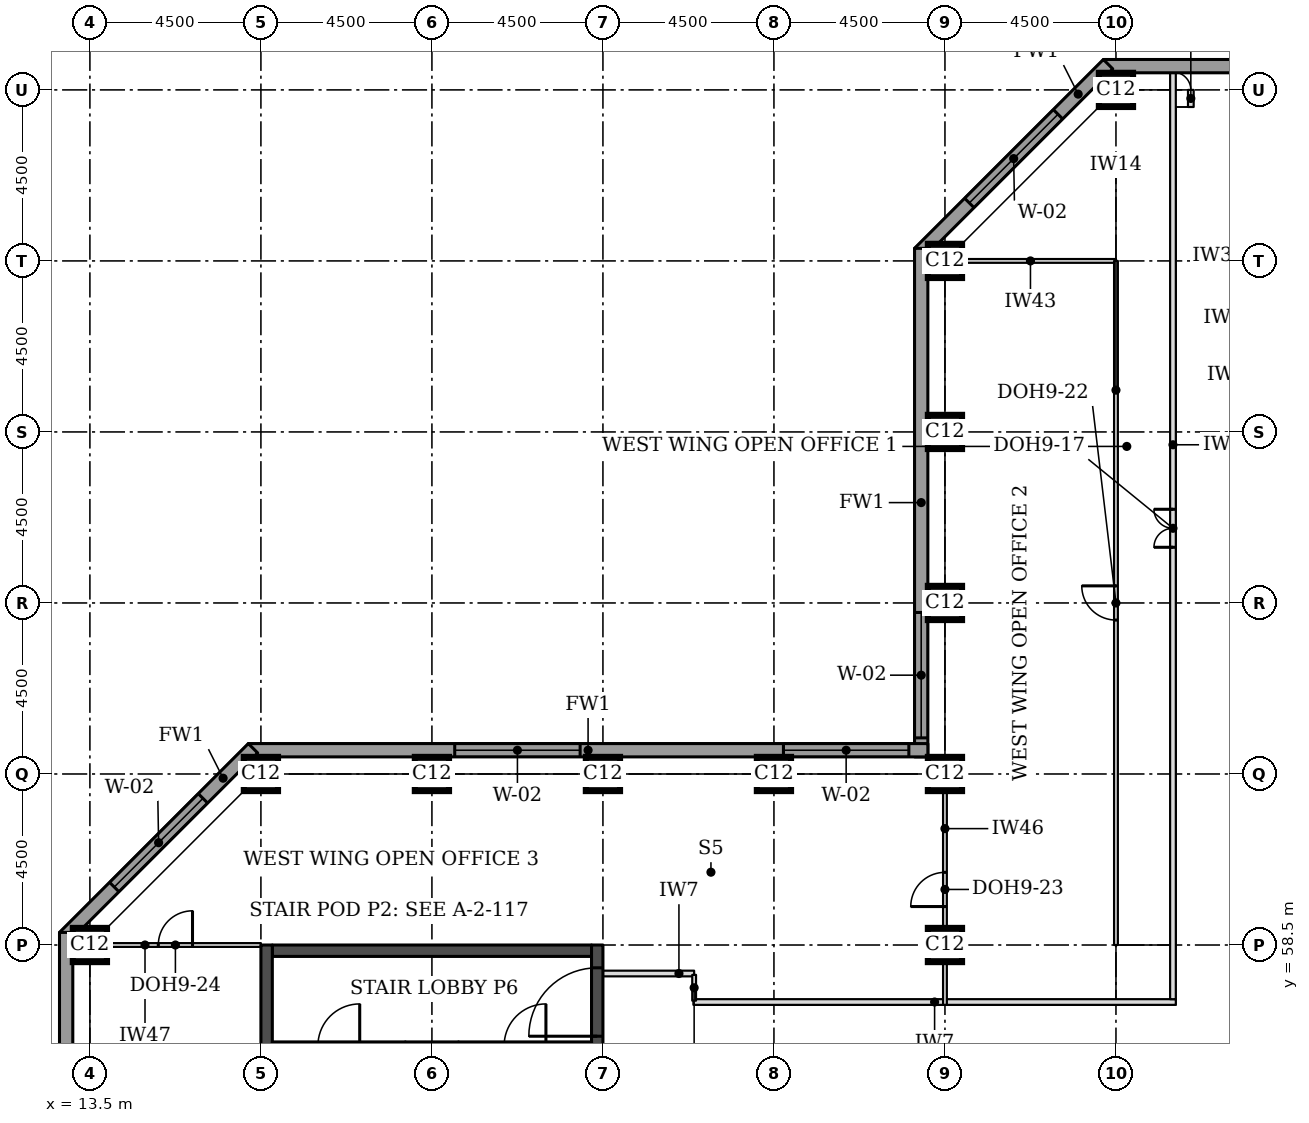
"""IFC4 building model, lengths in metres.
Left out: names, types, materials, properties, quantities, classifications, styles, units other than length and angle.
Written with IfcOpenShell. Run it as: python <this file> out.ifc"""

import sys

from ifc_helpers import new_model, si_unit, direction, frame, frame_2d, origin, origin_2d, place, context, subcontext, project, spatial, rectangle, extrude, element, fill, save


model = new_model("IFC4")
c1 = context("Model", 3, precision=1e-05, world=origin(), true_north=direction((0.0, 1.0)))
c2 = subcontext(c1, "Body", "Model", "MODEL_VIEW")
j1 = project(units=[si_unit("LENGTHUNIT", "METRE"), si_unit("PLANEANGLEUNIT", "RADIAN")], contexts=[c1])
p1 = place(None, origin())
s1 = spatial("IfcSite", under=j1, at=p1, CompositionType="ELEMENT")
p2 = place(p1, origin())
s2 = spatial("IfcBuilding", under=s1, at=p2, CompositionType="ELEMENT")
p3 = place(p2, frame((0.0, 0.0, 215.6)))
s3 = spatial("IfcBuildingStorey", under=s2, at=p3, CompositionType="ELEMENT", Elevation=215.6)
for number, where, z_axis, x_axis in (
    (1, (13.5, 58.5, 0.0), (0.0, 0.0, 1.0), (1.0, 0.0, 0.0)),
    (2, (36.0, 58.5, 0.0), (0.0, 0.0, 1.0), (1.0, 0.0, 0.0)),
    (3, (18.0, 63.0, 0.0), (0.0, 0.0, 1.0), (1.0, 0.0, 0.0)),
    (4, (22.5, 63.0, 0.0), (0.0, 0.0, 1.0), (1.0, 0.0, 0.0)),
    (5, (27.0, 63.0, 0.0), (0.0, 0.0, 1.0), (1.0, 0.0, 0.0)),
    (6, (31.5, 63.0, 0.0), (0.0, 0.0, 1.0), (1.0, 0.0, 0.0)),
    (7, (36.0, 63.0, 0.0), (0.0, 0.0, 1.0), (1.0, 0.0, 0.0)),
    (8, (36.0, 67.5, 0.0), (0.0, 0.0, 1.0), (1.0, 0.0, 0.0)),
    (9, (36.0, 72.0, 0.0), (0.0, 0.0, 1.0), (1.0, 0.0, 0.0)),
    (10, (36.0, 76.5, 0.0), (0.0, 0.0, 1.0), (1.0, 0.0, 0.0)),
    (11, (40.5, 81.0, 0.0), (0.0, 0.0, 1.0), (1.0, 0.0, 0.0)),
):
    element("IfcColumn", number, at=place(p3, frame(where, z_axis=z_axis, x_axis=x_axis)), inside=s3, PredefinedType="COLUMN", context=c2, shape_type="SweptSolid", body=[
        extrude(rectangle(XDim=0.9, YDim=0.9, at=origin_2d()), origin(), (0.0, 0.0, 1.0), 3.7),
    ])
p4 = place(p3, frame((18.3, 58.35, 0.0), z_axis=(0.0, 0.0, 1.0), x_axis=(1.0, 0.0, 0.0)))
e12 = element("IfcWall", 12, at=p4, inside=s3, PredefinedType="SHEAR", context=c2, shape_type="SweptSolid", body=[
    extrude(rectangle(XDim=8.4, YDim=0.3, at=frame_2d((4.2, 0.0))), origin(), (0.0, 0.0, 1.0), 3.7),
])
p5 = place(p3, frame((18.15, 49.5, 0.0), z_axis=(0.0, 0.0, 1.0), x_axis=(0.0, 1.0, 0.0)))
e13 = element("IfcWall", 13, at=p5, inside=s3, PredefinedType="SHEAR", context=c2, shape_type="SweptSolid", body=[
    extrude(rectangle(XDim=9.0, YDim=0.3, at=frame_2d((4.5, 0.0))), origin(), (0.0, 0.0, 1.0), 3.7),
])
p6 = place(p3, frame((26.85, 49.5, 0.0), z_axis=(0.0, 0.0, 1.0), x_axis=(0.0, 1.0, 0.0)))
e14 = element("IfcWall", 14, at=p6, inside=s3, PredefinedType="SHEAR", context=c2, shape_type="SweptSolid", body=[
    extrude(rectangle(XDim=9.0, YDim=0.3, at=frame_2d((4.5, 0.0))), origin(), (0.0, 0.0, 1.0), 3.7),
])
p7 = place(p6, frame((6.6, 0.0, 0.0)))
e15 = element("IfcOpeningElement", 15, at=p7, cuts=e14, PredefinedType="OPENING", context=c2, shape_type="SweptSolid", body=[
    extrude(rectangle(XDim=1.8, YDim=2.1, at=frame_2d((0.9, 1.05))), frame((0.0, 0.16, 0.0), z_axis=(0.0, -1.0, 0.0), x_axis=(1.0, 0.0, 0.0)), (0.0, 0.0, 1.0), 0.32),
])
p8 = place(p3, frame((72.331, 81.625, 0.0), z_axis=(0.0, 0.0, 1.0), x_axis=(-1.0, 0.0, 0.0)))
e16 = element("IfcWall", 16, at=p8, inside=s3, PredefinedType="STANDARD", context=c2, shape_type="SweptSolid", body=[
    extrude(rectangle(XDim=32.163, YDim=0.35, at=frame_2d((16.081, 0.0))), origin(), (0.0, 0.0, 1.0), 3.525),
])
p9 = place(p8, frame((5.431, 0.0, 0.9)))
e17 = element("IfcOpeningElement", 17, at=p9, cuts=e16, PredefinedType="OPENING", context=c2, shape_type="SweptSolid", body=[
    extrude(rectangle(XDim=3.3, YDim=1.9, at=frame_2d((1.65, 0.95))), frame((0.0, 0.185, 0.0), z_axis=(0.0, -1.0, 0.0), x_axis=(1.0, 0.0, 0.0)), (0.0, 0.0, 1.0), 0.37),
])
p10 = place(p8, frame((9.931, 0.0, 0.9)))
e18 = element("IfcOpeningElement", 18, at=p10, cuts=e16, PredefinedType="OPENING", context=c2, shape_type="SweptSolid", body=[
    extrude(rectangle(XDim=3.3, YDim=1.9, at=frame_2d((1.65, 0.95))), frame((0.0, 0.185, 0.0), z_axis=(0.0, -1.0, 0.0), x_axis=(1.0, 0.0, 0.0)), (0.0, 0.0, 1.0), 0.37),
])
p11 = place(p8, frame((14.431, 0.0, 0.9)))
e19 = element("IfcOpeningElement", 19, at=p11, cuts=e16, PredefinedType="OPENING", context=c2, shape_type="SweptSolid", body=[
    extrude(rectangle(XDim=3.3, YDim=1.9, at=frame_2d((1.65, 0.95))), frame((0.0, 0.185, 0.0), z_axis=(0.0, -1.0, 0.0), x_axis=(1.0, 0.0, 0.0)), (0.0, 0.0, 1.0), 0.37),
])
p12 = place(p8, frame((18.931, 0.0, 0.9)))
e20 = element("IfcOpeningElement", 20, at=p12, cuts=e16, PredefinedType="OPENING", context=c2, shape_type="SweptSolid", body=[
    extrude(rectangle(XDim=3.3, YDim=1.9, at=frame_2d((1.65, 0.95))), frame((0.0, 0.185, 0.0), z_axis=(0.0, -1.0, 0.0), x_axis=(1.0, 0.0, 0.0)), (0.0, 0.0, 1.0), 0.37),
])
p13 = place(p8, frame((23.431, 0.0, 0.9)))
e21 = element("IfcOpeningElement", 21, at=p13, cuts=e16, PredefinedType="OPENING", context=c2, shape_type="SweptSolid", body=[
    extrude(rectangle(XDim=3.3, YDim=1.9, at=frame_2d((1.65, 0.95))), frame((0.0, 0.185, 0.0), z_axis=(0.0, -1.0, 0.0), x_axis=(1.0, 0.0, 0.0)), (0.0, 0.0, 1.0), 0.37),
])
p14 = place(p3, frame((40.292, 81.676, 0.0), z_axis=(0.0, 0.0, 1.0), x_axis=(-0.707106781187, -0.707106781187, 0.0)))
e22 = element("IfcWall", 22, at=p14, inside=s3, PredefinedType="STANDARD", context=c2, shape_type="SweptSolid", body=[
    extrude(rectangle(XDim=7.027, YDim=0.35, at=frame_2d((3.513, 0.0))), origin(), (0.0, 0.0, 1.0), 3.525),
])
p15 = place(p14, frame((1.863, 0.0, 0.9)))
e23 = element("IfcOpeningElement", 23, at=p15, cuts=e22, PredefinedType="OPENING", context=c2, shape_type="SweptSolid", body=[
    extrude(rectangle(XDim=3.3, YDim=1.9, at=frame_2d((1.65, 0.95))), frame((0.0, 0.185, 0.0), z_axis=(0.0, -1.0, 0.0), x_axis=(1.0, 0.0, 0.0)), (0.0, 0.0, 1.0), 0.37),
])
p16 = place(p3, frame((35.375, 76.831, 0.0), z_axis=(0.0, 0.0, 1.0), x_axis=(0.0, -1.0, 0.0)))
e24 = element("IfcWall", 24, at=p16, inside=s3, PredefinedType="STANDARD", context=c2, shape_type="SweptSolid", body=[
    extrude(rectangle(XDim=13.381, YDim=0.35, at=frame_2d((6.691, 0.0))), origin(), (0.0, 0.0, 1.0), 3.525),
])
p17 = place(p16, frame((9.581, 0.0, 0.9)))
e25 = element("IfcOpeningElement", 25, at=p17, cuts=e24, PredefinedType="OPENING", context=c2, shape_type="SweptSolid", body=[
    extrude(rectangle(XDim=3.3, YDim=1.9, at=frame_2d((1.65, 0.95))), frame((0.0, 0.185, 0.0), z_axis=(0.0, -1.0, 0.0), x_axis=(1.0, 0.0, 0.0)), (0.0, 0.0, 1.0), 0.37),
])
p18 = place(p3, frame((35.55, 63.625, 0.0), z_axis=(0.0, 0.0, 1.0), x_axis=(-1.0, 0.0, 0.0)))
e26 = element("IfcWall", 26, at=p18, inside=s3, PredefinedType="STANDARD", context=c2, shape_type="SweptSolid", body=[
    extrude(rectangle(XDim=17.881, YDim=0.35, at=frame_2d((8.941, 0.0))), origin(), (0.0, 0.0, 1.0), 3.525),
])
p19 = place(p18, frame((0.5, 0.0, 0.9)))
e27 = element("IfcOpeningElement", 27, at=p19, cuts=e26, PredefinedType="OPENING", context=c2, shape_type="SweptSolid", body=[
    extrude(rectangle(XDim=3.3, YDim=1.9, at=frame_2d((1.65, 0.95))), frame((0.0, 0.185, 0.0), z_axis=(0.0, -1.0, 0.0), x_axis=(1.0, 0.0, 0.0)), (0.0, 0.0, 1.0), 0.37),
])
p20 = place(p18, frame((9.15, 0.0, 0.9)))
e28 = element("IfcOpeningElement", 28, at=p20, cuts=e26, PredefinedType="OPENING", context=c2, shape_type="SweptSolid", body=[
    extrude(rectangle(XDim=3.3, YDim=1.9, at=frame_2d((1.65, 0.95))), frame((0.0, 0.185, 0.0), z_axis=(0.0, -1.0, 0.0), x_axis=(1.0, 0.0, 0.0)), (0.0, 0.0, 1.0), 0.37),
])
p21 = place(p3, frame((17.792, 63.676, 0.0), z_axis=(0.0, 0.0, 1.0), x_axis=(-0.707106781187, -0.707106781187, 0.0)))
e29 = element("IfcWall", 29, at=p21, inside=s3, PredefinedType="STANDARD", context=c2, shape_type="SweptSolid", body=[
    extrude(rectangle(XDim=7.027, YDim=0.35, at=frame_2d((3.513, 0.0))), origin(), (0.0, 0.0, 1.0), 3.525),
])
p22 = place(p21, frame((1.863, 0.0, 0.9)))
e30 = element("IfcOpeningElement", 30, at=p22, cuts=e29, PredefinedType="OPENING", context=c2, shape_type="SweptSolid", body=[
    extrude(rectangle(XDim=3.3, YDim=1.9, at=frame_2d((1.65, 0.95))), frame((0.0, 0.185, 0.0), z_axis=(0.0, -1.0, 0.0), x_axis=(1.0, 0.0, 0.0)), (0.0, 0.0, 1.0), 0.37),
])
p23 = place(p3, frame((12.875, 58.831, 0.0), z_axis=(0.0, 0.0, 1.0), x_axis=(0.0, -1.0, 0.0)))
e31 = element("IfcWall", 31, at=p23, inside=s3, PredefinedType="STANDARD", context=c2, shape_type="SweptSolid", body=[
    extrude(rectangle(XDim=14.163, YDim=0.35, at=frame_2d((7.081, 0.0))), origin(), (0.0, 0.0, 1.0), 3.525),
])
p24 = place(p23, frame((5.431, 0.0, 0.9)))
e32 = element("IfcOpeningElement", 32, at=p24, cuts=e31, PredefinedType="OPENING", context=c2, shape_type="SweptSolid", body=[
    extrude(rectangle(XDim=3.3, YDim=1.9, at=frame_2d((1.65, 0.95))), frame((0.0, 0.185, 0.0), z_axis=(0.0, -1.0, 0.0), x_axis=(1.0, 0.0, 0.0)), (0.0, 0.0, 1.0), 0.37),
])
p25 = place(p3, frame((29.38, 57.0, 0.0), z_axis=(0.0, 0.0, 1.0), x_axis=(1.0, 0.0, 0.0)))
e33 = element("IfcWall", 33, at=p25, inside=s3, PredefinedType="PARTITIONING", context=c2, shape_type="SweptSolid", body=[
    extrude(rectangle(XDim=12.695, YDim=0.15, at=frame_2d((6.348, 0.0))), origin(), (0.0, 0.0, 1.0), 3.55),
])
p26 = place(p3, frame((42.0, 57.075, 0.0), z_axis=(0.0, 0.0, 1.0), x_axis=(0.0, 1.0, 0.0)))
e34 = element("IfcWall", 34, at=p26, inside=s3, PredefinedType="PARTITIONING", context=c2, shape_type="SweptSolid", body=[
    extrude(rectangle(XDim=24.375, YDim=0.15, at=frame_2d((12.188, 0.0))), origin(), (0.0, 0.0, 1.0), 3.55),
])
p27 = place(p26, frame((11.89, 0.0, 0.0)))
e35 = element("IfcOpeningElement", 35, at=p27, cuts=e34, PredefinedType="OPENING", context=c2, shape_type="SweptSolid", body=[
    extrude(rectangle(XDim=1.0, YDim=2.1, at=frame_2d((0.5, 1.05))), frame((0.0, 0.085, 0.0), z_axis=(0.0, -1.0, 0.0), x_axis=(1.0, 0.0, 0.0)), (0.0, 0.0, 1.0), 0.17),
])
p28 = place(p3, frame((36.0, 76.5, 0.0), z_axis=(0.0, 0.0, 1.0), x_axis=(1.0, 0.0, 0.0)))
e36 = element("IfcWall", 36, at=p28, inside=s3, PredefinedType="PARTITIONING", context=c2, shape_type="SweptSolid", body=[
    extrude(rectangle(XDim=4.5, YDim=0.1, at=frame_2d((2.25, 0.0))), origin(), (0.0, 0.0, 1.0), 3.096),
])
p29 = place(p3, frame((40.5, 76.5, 0.0), z_axis=(0.0, 0.0, 1.0), x_axis=(0.0, -1.0, 0.0)))
e37 = element("IfcWall", 37, at=p29, inside=s3, PredefinedType="PARTITIONING", context=c2, shape_type="SweptSolid", body=[
    extrude(rectangle(XDim=18.0, YDim=0.1, at=frame_2d((9.0, 0.0))), origin(), (0.0, 0.0, 1.0), 3.55),
])
p30 = place(p29, frame((8.55, 0.0, 0.0)))
e38 = element("IfcOpeningElement", 38, at=p30, cuts=e37, PredefinedType="OPENING", context=c2, shape_type="SweptSolid", body=[
    extrude(rectangle(XDim=0.9, YDim=2.1, at=frame_2d((0.45, 1.05))), frame((0.0, 0.06, 0.0), z_axis=(0.0, -1.0, 0.0), x_axis=(1.0, 0.0, 0.0)), (0.0, 0.0, 1.0), 0.12),
])
p31 = place(p3, frame((36.0, 63.0, 0.0), z_axis=(0.0, 0.0, 1.0), x_axis=(0.0, -1.0, 0.0)))
e39 = element("IfcWall", 39, at=p31, inside=s3, PredefinedType="PARTITIONING", context=c2, shape_type="SweptSolid", body=[
    extrude(rectangle(XDim=6.075, YDim=0.1, at=frame_2d((3.038, 0.0))), origin(), (0.0, 0.0, 1.0), 2.8),
])
p32 = place(p31, frame((2.588, 0.0, 0.0)))
e40 = element("IfcOpeningElement", 40, at=p32, cuts=e39, PredefinedType="OPENING", context=c2, shape_type="SweptSolid", body=[
    extrude(rectangle(XDim=0.9, YDim=2.1, at=frame_2d((0.45, 1.05))), frame((0.0, 0.06, 0.0), z_axis=(0.0, -1.0, 0.0), x_axis=(1.0, 0.0, 0.0)), (0.0, 0.0, 1.0), 0.12),
])
p33 = place(p3, frame((13.5, 58.5, 0.0), z_axis=(0.0, 0.0, 1.0), x_axis=(1.0, 0.0, 0.0)))
e41 = element("IfcWall", 41, at=p33, inside=s3, PredefinedType="PARTITIONING", context=c2, shape_type="SweptSolid", body=[
    extrude(rectangle(XDim=4.5, YDim=0.1, at=frame_2d((2.25, 0.0))), origin(), (0.0, 0.0, 1.0), 2.55),
])
p34 = place(p33, frame((1.8, 0.0, 0.0)))
e42 = element("IfcOpeningElement", 42, at=p34, cuts=e41, PredefinedType="OPENING", context=c2, shape_type="SweptSolid", body=[
    extrude(rectangle(XDim=0.9, YDim=2.1, at=frame_2d((0.45, 1.05))), frame((0.0, 0.06, 0.0), z_axis=(0.0, -1.0, 0.0), x_axis=(1.0, 0.0, 0.0)), (0.0, 0.0, 1.0), 0.12),
])
p35 = place(p3, frame((42.47, 80.55, 0.0), z_axis=(0.0, 0.0, 1.0), x_axis=(0.0, 1.0, 0.0)))
e43 = element("IfcWall", 43, at=p35, inside=s3, PredefinedType="PARTITIONING", context=c2, shape_type="SweptSolid", body=[
    extrude(rectangle(XDim=0.45, YDim=0.15, at=frame_2d((0.225, 0.0))), origin(), (0.0, 0.0, 1.0), 3.55),
])
p36 = place(p3, frame((27.0, 57.75, 0.0), z_axis=(0.0, 0.0, 1.0), x_axis=(1.0, 0.0, 0.0)))
e44 = element("IfcWall", 44, at=p36, inside=s3, PredefinedType="PARTITIONING", context=c2, shape_type="SweptSolid", body=[
    extrude(rectangle(XDim=2.4, YDim=0.15, at=frame_2d((1.2, 0.0))), origin(), (0.0, 0.0, 1.0), 3.55),
])
p37 = place(p3, frame((29.4, 57.715, 0.0), z_axis=(0.0, 0.0, 1.0), x_axis=(0.0, -1.0, 0.0)))
e45 = element("IfcWall", 45, at=p37, inside=s3, PredefinedType="PARTITIONING", context=c2, shape_type="SweptSolid", body=[
    extrude(rectangle(XDim=0.68, YDim=0.1, at=frame_2d((0.34, 0.0))), origin(), (0.0, 0.0, 1.0), 3.55),
])
p38 = place(p3, frame((21.8, 55.85, 0.0), z_axis=(0.0, 0.0, 1.0), x_axis=(1.0, 0.0, 0.0)))
e46 = element("IfcWall", 46, at=p38, inside=s3, PredefinedType="SOLIDWALL", context=c2, shape_type="SweptSolid", body=[
    extrude(rectangle(XDim=1.4, YDim=0.2, at=frame_2d((0.7, 0.0))), origin(), (0.0, 0.0, 1.0), 3.55),
])
p39 = place(p3, frame((18.3, 55.85, 0.0), z_axis=(0.0, 0.0, 1.0), x_axis=(1.0, 0.0, 0.0)))
e47 = element("IfcWall", 47, at=p39, inside=s3, PredefinedType="SOLIDWALL", context=c2, shape_type="SweptSolid", body=[
    extrude(rectangle(XDim=3.5, YDim=0.2, at=frame_2d((1.75, 0.0))), origin(), (0.0, 0.0, 1.0), 3.55),
])
p40 = place(p39, frame((1.2, 0.0, 0.0)))
e48 = element("IfcOpeningElement", 48, at=p40, cuts=e47, PredefinedType="OPENING", context=c2, shape_type="SweptSolid", body=[
    extrude(rectangle(XDim=1.1, YDim=2.1, at=frame_2d((0.55, 1.05))), frame((0.0, 0.11, 0.0), z_axis=(0.0, -1.0, 0.0), x_axis=(1.0, 0.0, 0.0)), (0.0, 0.0, 1.0), 0.22),
])
p41 = place(p3, frame((23.2, 55.85, 0.0), z_axis=(0.0, 0.0, 1.0), x_axis=(1.0, 0.0, 0.0)))
e49 = element("IfcWall", 49, at=p41, inside=s3, PredefinedType="SOLIDWALL", context=c2, shape_type="SweptSolid", body=[
    extrude(rectangle(XDim=3.5, YDim=0.2, at=frame_2d((1.75, 0.0))), origin(), (0.0, 0.0, 1.0), 3.55),
])
p42 = place(p41, frame((1.2, 0.0, 0.0)))
e50 = element("IfcOpeningElement", 50, at=p42, cuts=e49, PredefinedType="OPENING", context=c2, shape_type="SweptSolid", body=[
    extrude(rectangle(XDim=1.1, YDim=2.1, at=frame_2d((0.55, 1.05))), frame((0.0, 0.11, 0.0), z_axis=(0.0, -1.0, 0.0), x_axis=(1.0, 0.0, 0.0)), (0.0, 0.0, 1.0), 0.22),
])
p43 = place(p15, origin())
e51 = element("IfcWindow", 51, at=p43, inside=s3, PartitioningType="SINGLE_PANEL", PredefinedType="WINDOW", context=c2, shape_type="SweptSolid", body=[
    extrude(rectangle(XDim=3.3, YDim=1.9, at=frame_2d((1.65, 0.95))), frame((0.0, 0.085, 0.0), z_axis=(0.0, -1.0, 0.0), x_axis=(1.0, 0.0, 0.0)), (0.0, 0.0, 1.0), 0.06),
])
fill(e23, e51)
p44 = place(p17, origin())
e52 = element("IfcWindow", 52, at=p44, inside=s3, PartitioningType="SINGLE_PANEL", PredefinedType="WINDOW", context=c2, shape_type="SweptSolid", body=[
    extrude(rectangle(XDim=3.3, YDim=1.9, at=frame_2d((1.65, 0.95))), frame((0.0, 0.085, 0.0), z_axis=(0.0, -1.0, 0.0), x_axis=(1.0, 0.0, 0.0)), (0.0, 0.0, 1.0), 0.06),
])
fill(e25, e52)
p45 = place(p19, origin())
e53 = element("IfcWindow", 53, at=p45, inside=s3, PartitioningType="SINGLE_PANEL", PredefinedType="WINDOW", context=c2, shape_type="SweptSolid", body=[
    extrude(rectangle(XDim=3.3, YDim=1.9, at=frame_2d((1.65, 0.95))), frame((0.0, 0.085, 0.0), z_axis=(0.0, -1.0, 0.0), x_axis=(1.0, 0.0, 0.0)), (0.0, 0.0, 1.0), 0.06),
])
fill(e27, e53)
p46 = place(p20, origin())
e54 = element("IfcWindow", 54, at=p46, inside=s3, PartitioningType="SINGLE_PANEL", PredefinedType="WINDOW", context=c2, shape_type="SweptSolid", body=[
    extrude(rectangle(XDim=3.3, YDim=1.9, at=frame_2d((1.65, 0.95))), frame((0.0, 0.085, 0.0), z_axis=(0.0, -1.0, 0.0), x_axis=(1.0, 0.0, 0.0)), (0.0, 0.0, 1.0), 0.06),
])
fill(e28, e54)
p47 = place(p22, origin())
e55 = element("IfcWindow", 55, at=p47, inside=s3, PartitioningType="SINGLE_PANEL", PredefinedType="WINDOW", context=c2, shape_type="SweptSolid", body=[
    extrude(rectangle(XDim=3.3, YDim=1.9, at=frame_2d((1.65, 0.95))), frame((0.0, 0.085, 0.0), z_axis=(0.0, -1.0, 0.0), x_axis=(1.0, 0.0, 0.0)), (0.0, 0.0, 1.0), 0.06),
])
fill(e30, e55)
p48 = place(p27, origin())
e56 = element("IfcDoor", 56, at=p48, inside=s3, OperationType="DOUBLE_DOOR_SINGLE_SWING", PredefinedType="DOOR", context=c2, shape_type="SweptSolid", body=[
    extrude(rectangle(XDim=1.0, YDim=2.1, at=frame_2d((0.5, 1.05))), frame((0.0, 0.025, 0.0), z_axis=(0.0, -1.0, 0.0), x_axis=(1.0, 0.0, 0.0)), (0.0, 0.0, 1.0), 0.05),
])
fill(e35, e56)
p49 = place(p30, frame((0.9, 0.0, 0.0), z_axis=(0.0, 0.0, 1.0), x_axis=(-1.0, 0.0, 0.0)))
e57 = element("IfcDoor", 57, at=p49, inside=s3, OperationType="SINGLE_SWING_RIGHT", PredefinedType="DOOR", context=c2, shape_type="SweptSolid", body=[
    extrude(rectangle(XDim=0.9, YDim=2.1, at=frame_2d((0.45, 1.05))), frame((0.0, 0.025, 0.0), z_axis=(0.0, -1.0, 0.0), x_axis=(1.0, 0.0, 0.0)), (0.0, 0.0, 1.0), 0.05),
])
fill(e38, e57)
p50 = place(p32, frame((0.9, 0.0, 0.0), z_axis=(0.0, 0.0, 1.0), x_axis=(-1.0, 0.0, 0.0)))
e58 = element("IfcDoor", 58, at=p50, inside=s3, OperationType="SINGLE_SWING_LEFT", PredefinedType="DOOR", context=c2, shape_type="SweptSolid", body=[
    extrude(rectangle(XDim=0.9, YDim=2.1, at=frame_2d((0.45, 1.05))), frame((0.0, 0.025, 0.0), z_axis=(0.0, -1.0, 0.0), x_axis=(1.0, 0.0, 0.0)), (0.0, 0.0, 1.0), 0.05),
])
fill(e40, e58)
p51 = place(p34, origin())
e59 = element("IfcDoor", 59, at=p51, inside=s3, OperationType="SINGLE_SWING_RIGHT", PredefinedType="DOOR", context=c2, shape_type="SweptSolid", body=[
    extrude(rectangle(XDim=0.9, YDim=2.1, at=frame_2d((0.45, 1.05))), frame((0.0, 0.025, 0.0), z_axis=(0.0, -1.0, 0.0), x_axis=(1.0, 0.0, 0.0)), (0.0, 0.0, 1.0), 0.05),
])
fill(e42, e59)
p52 = place(p7, origin())
e60 = element("IfcDoor", 60, at=p52, inside=s3, OperationType="SINGLE_SWING_LEFT", PredefinedType="DOOR", context=c2, shape_type="SweptSolid", body=[
    extrude(rectangle(XDim=1.8, YDim=2.1, at=frame_2d((0.9, 1.05))), frame((0.0, 0.025, 0.0), z_axis=(0.0, -1.0, 0.0), x_axis=(1.0, 0.0, 0.0)), (0.0, 0.0, 1.0), 0.05),
])
fill(e15, e60)
save(model, sys.argv[1])
